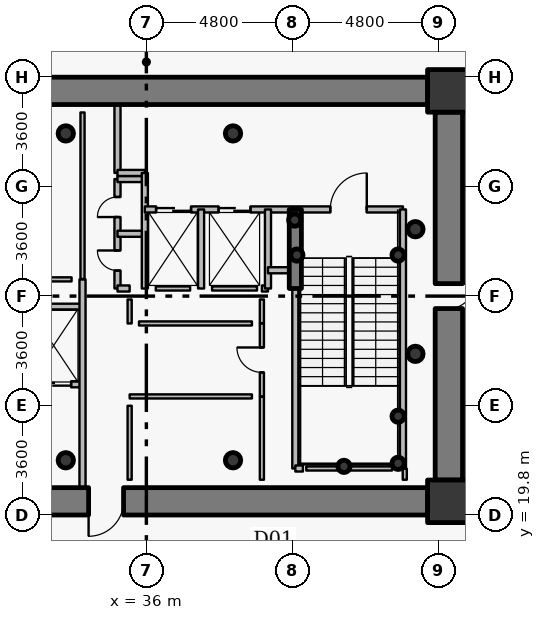
"""IFC4 building model, lengths in metres.
Left out: names, types, materials, properties, quantities, classifications, styles, units other than length and angle.
Written with IfcOpenShell. Run it as: python <this file> out.ifc"""

import sys

from ifc_helpers import new_model, si_unit, direction, frame, frame_2d, origin, origin_2d, place, context, subcontext, project, spatial, rectangle, hollow_circle, extrude, source, transform, mapped, element, fill, save


model = new_model("IFC4")
c1 = context("Model", 3, precision=1e-05, world=origin(), true_north=direction((0.0, 1.0)))
c2 = subcontext(c1, "Body", "Model", "MODEL_VIEW")
j1 = project(units=[si_unit("LENGTHUNIT", "METRE"), si_unit("PLANEANGLEUNIT", "RADIAN")], contexts=[c1])
p1 = place(None, origin())
s1 = spatial("IfcSite", under=j1, at=p1, CompositionType="ELEMENT")
p2 = place(p1, origin())
s2 = spatial("IfcBuilding", under=s1, at=p2, CompositionType="ELEMENT")
p3 = place(p2, frame((0.0, 0.0, -9.0)))
s3 = spatial("IfcBuildingStorey", under=s2, at=p3, CompositionType="ELEMENT", Elevation=-9.0)
for number, where, z_axis, x_axis in (
    (1, (45.95, 20.25, 0.0), (0.0, 0.0, 1.0), (1.0, 0.0, 0.0)),
    (2, (45.95, 33.75, 0.0), (0.0, 0.0, 1.0), (1.0, 0.0, 0.0)),
):
    element("IfcColumn", number, at=place(p3, frame(where, z_axis=z_axis, x_axis=x_axis)), inside=s3, PredefinedType="COLUMN", context=c2, shape_type="SweptSolid", body=[
        extrude(rectangle(XDim=1.4, YDim=1.4, at=origin_2d()), origin(), (0.0, 0.0, 1.0), 4.5),
    ])
for number, where, z_axis, x_axis in (
    (3, (33.35, 21.6, 0.0), (0.0, 0.0, 1.0), (1.0, 0.0, 0.0)),
    (4, (38.85, 21.6, 0.0), (0.0, 0.0, 1.0), (1.0, 0.0, 0.0)),
    (5, (38.85, 32.35, 0.0), (0.0, 0.0, 1.0), (1.0, 0.0, 0.0)),
    (6, (33.35, 32.35, 0.0), (0.0, 0.0, 1.0), (1.0, 0.0, 0.0)),
):
    element("IfcColumn", number, at=place(p3, frame(where, z_axis=z_axis, x_axis=x_axis)), inside=s3, PredefinedType="COLUMN", context=c2, shape_type="SweptSolid", body=[
        extrude(hollow_circle(Radius=0.254, WallThickness=0.02, at=origin_2d()), origin(), (0.0, 0.0, 1.0), 4.5),
    ])
for number, where, z_axis, x_axis in (
    (7, (44.28, 21.5, 0.0), (0.0, 0.0, 1.0), (1.0, 0.0, 0.0)),
    (8, (44.28, 23.05, 0.0), (0.0, 0.0, 1.0), (1.0, 0.0, 0.0)),
    (9, (42.5, 21.4, 0.0), (0.0, 0.0, 1.0), (1.0, 0.0, 0.0)),
    (10, (40.95, 28.35, 0.0), (0.0, 0.0, 1.0), (1.0, 0.0, 0.0)),
    (11, (44.28, 28.35, 0.0), (0.0, 0.0, 1.0), (1.0, 0.0, 0.0)),
    (12, (40.88, 29.5, 0.0), (0.0, 0.0, 1.0), (1.0, 0.0, 0.0)),
):
    element("IfcColumn", number, at=place(p3, frame(where, z_axis=z_axis, x_axis=x_axis)), inside=s3, PredefinedType="COLUMN", context=c2, shape_type="SweptSolid", body=[
        extrude(hollow_circle(Radius=0.203, WallThickness=0.016, at=origin_2d()), origin(), (0.0, 0.0, 1.0), 4.5),
    ])
p4 = place(p3, frame((26.75, 33.75, 0.0), z_axis=(0.0, 0.0, 1.0), x_axis=(1.0, 0.0, 0.0)))
e13 = element("IfcWall", 13, at=p4, inside=s3, PredefinedType="SHEAR", context=c2, shape_type="SweptSolid", body=[
    extrude(rectangle(XDim=18.5, YDim=0.9, at=frame_2d((9.25, 0.0))), origin(), (0.0, 0.0, 1.0), 3.65),
])
p5 = place(p3, frame((45.95, 33.05, 0.0), z_axis=(0.0, 0.0, 1.0), x_axis=(0.0, -1.0, 0.0)))
e14 = element("IfcWall", 14, at=p5, inside=s3, PredefinedType="SHEAR", context=c2, shape_type="SweptSolid", body=[
    extrude(rectangle(XDim=12.1, YDim=0.9, at=frame_2d((6.05, 0.0))), origin(), (0.0, 0.0, 1.0), 3.65),
])
p6 = place(p5, frame((5.64, 0.0, 0.0)))
e15 = element("IfcOpeningElement", 15, at=p6, cuts=e14, PredefinedType="OPENING", context=c2, shape_type="SweptSolid", body=[
    extrude(rectangle(XDim=0.82, YDim=2.1, at=origin_2d()), frame((0.41, 0.46, 1.05), z_axis=(0.0, -1.0, 0.0), x_axis=(1.0, 0.0, 0.0)), (0.0, 0.0, 1.0), 0.92),
])
p7 = place(p3, frame((45.25, 20.25, 0.0), z_axis=(0.0, 0.0, 1.0), x_axis=(-1.0, 0.0, 0.0)))
e16 = element("IfcWall", 16, at=p7, inside=s3, PredefinedType="SHEAR", context=c2, shape_type="SweptSolid", body=[
    extrude(rectangle(XDim=18.5, YDim=0.9, at=frame_2d((9.25, 0.0))), origin(), (0.0, 0.0, 1.0), 3.65),
])
p8 = place(p7, frame((10.0, 0.0, 0.0)))
e17 = element("IfcOpeningElement", 17, at=p8, cuts=e16, PredefinedType="OPENING", context=c2, shape_type="SweptSolid", body=[
    extrude(rectangle(XDim=1.15, YDim=2.15, at=origin_2d()), frame((0.575, 0.46, 1.075), z_axis=(0.0, -1.0, 0.0), x_axis=(1.0, 0.0, 0.0)), (0.0, 0.0, 1.0), 0.92),
])
p9 = place(p3, frame((40.9, 27.25, 0.0), z_axis=(0.0, 0.0, 1.0), x_axis=(0.0, 1.0, 0.0)))
e18 = element("IfcWall", 18, at=p9, inside=s3, PredefinedType="SHEAR", context=c2, shape_type="SweptSolid", body=[
    extrude(rectangle(XDim=2.6, YDim=0.4, at=frame_2d((1.3, 0.0))), origin(), (0.0, 0.0, 1.0), 3.8),
])
for number, where, z_axis, x_axis in (
    (19, (44.85, 25.1, 0.0), (0.0, 0.0, 1.0), (1.0, 0.0, 0.0)),
    (20, (44.85, 29.2, 0.0), (0.0, 0.0, 1.0), (1.0, 0.0, 0.0)),
):
    element("IfcColumn", number, at=place(p3, frame(where, z_axis=z_axis, x_axis=x_axis)), inside=s3, PredefinedType="COLUMN", context=c2, shape_type="SweptSolid", body=[
        extrude(hollow_circle(Radius=0.254, WallThickness=0.02, at=origin_2d()), origin(), (0.0, 0.0, 1.0), 4.5),
    ])
p10 = place(p3, frame((32.0, 24.1, 0.0), z_axis=(0.0, 0.0, 1.0), x_axis=(1.0, 0.0, 0.0)))
e21 = element("IfcWall", 21, at=p10, inside=s3, PredefinedType="PARTITIONING", context=c2, shape_type="SweptSolid", body=[
    extrude(rectangle(XDim=1.9, YDim=0.2, at=frame_2d((0.95, 0.0))), origin(), (0.0, 0.0, 1.0), 3.785),
])
p11 = place(p10, frame((0.375, 0.0, 0.0)))
e22 = element("IfcOpeningElement", 22, at=p11, cuts=e21, PredefinedType="OPENING", context=c2, shape_type="SweptSolid", body=[
    extrude(rectangle(XDim=1.15, YDim=2.15, at=origin_2d()), frame((0.575, 0.11, 1.075), z_axis=(0.0, -1.0, 0.0), x_axis=(1.0, 0.0, 0.0)), (0.0, 0.0, 1.0), 0.22),
])
p12 = place(p3, frame((32.0, 26.65, 0.0), z_axis=(0.0, 0.0, 1.0), x_axis=(1.0, 0.0, 0.0)))
e23 = element("IfcWall", 23, at=p12, inside=s3, PredefinedType="PARTITIONING", context=c2, shape_type="SweptSolid", body=[
    extrude(rectangle(XDim=1.9, YDim=0.2, at=frame_2d((0.95, 0.0))), origin(), (0.0, 0.0, 1.0), 3.785),
])
p13 = place(p3, frame((33.9, 20.7, 0.0), z_axis=(0.0, 0.0, 1.0), x_axis=(0.0, 1.0, 0.0)))
e24 = element("IfcWall", 24, at=p13, inside=s3, PredefinedType="PARTITIONING", context=c2, shape_type="SweptSolid", body=[
    extrude(rectangle(XDim=6.85, YDim=0.2, at=frame_2d((3.425, 0.0))), origin(), (0.0, 0.0, 1.0), 3.785),
])
p14 = place(p3, frame((35.05, 27.25, 0.0), z_axis=(0.0, 0.0, 1.0), x_axis=(0.0, 1.0, 0.0)))
e25 = element("IfcWall", 25, at=p14, inside=s3, PredefinedType="PARTITIONING", context=c2, shape_type="SweptSolid", body=[
    extrude(rectangle(XDim=3.6, YDim=0.2, at=frame_2d((1.8, 0.0))), origin(), (0.0, 0.0, 1.0), 4.2),
])
p15 = place(p14, frame((0.59, 0.0, 0.0)))
e26 = element("IfcOpeningElement", 26, at=p15, cuts=e25, PredefinedType="OPENING", context=c2, shape_type="SweptSolid", body=[
    extrude(rectangle(XDim=0.66, YDim=2.05, at=origin_2d()), frame((0.33, 0.11, 1.025), z_axis=(0.0, -1.0, 0.0), x_axis=(1.0, 0.0, 0.0)), (0.0, 0.0, 1.0), 0.22),
])
p16 = place(p14, frame((2.35, 0.0, 0.0)))
e27 = element("IfcOpeningElement", 27, at=p16, cuts=e25, PredefinedType="OPENING", context=c2, shape_type="SweptSolid", body=[
    extrude(rectangle(XDim=0.66, YDim=2.05, at=origin_2d()), frame((0.33, 0.11, 1.025), z_axis=(0.0, -1.0, 0.0), x_axis=(1.0, 0.0, 0.0)), (0.0, 0.0, 1.0), 0.22),
])
p17 = place(p3, frame((35.05, 27.25, 0.0), z_axis=(0.0, 0.0, 1.0), x_axis=(1.0, 0.0, 0.0)))
e28 = element("IfcWall", 28, at=p17, inside=s3, PredefinedType="PARTITIONING", context=c2, shape_type="SweptSolid", body=[
    extrude(rectangle(XDim=0.4, YDim=0.2, at=frame_2d((0.2, 0.0))), origin(), (0.0, 0.0, 1.0), 4.2),
])
for number, where, z_axis, x_axis in (
    (29, (35.05, 29.05, 0.0), (0.0, 0.0, 1.0), (1.0, 0.0, 0.0)),
    (30, (35.05, 30.85, 0.0), (0.0, 0.0, 1.0), (1.0, 0.0, 0.0)),
):
    element("IfcWall", number, at=place(p3, frame(where, z_axis=z_axis, x_axis=x_axis)), inside=s3, PredefinedType="PARTITIONING", context=c2, shape_type="SweptSolid", body=[
        extrude(rectangle(XDim=0.9, YDim=0.2, at=frame_2d((0.45, 0.0))), origin(), (0.0, 0.0, 1.0), 4.2),
    ])
p18 = place(p3, frame((35.05, 31.05, 0.0), z_axis=(0.0, 0.0, 1.0), x_axis=(0.0, 1.0, 0.0)))
e31 = element("IfcWall", 31, at=p18, inside=s3, PredefinedType="PARTITIONING", context=c2, shape_type="SweptSolid", body=[
    extrude(rectangle(XDim=2.25, YDim=0.2, at=frame_2d((1.125, 0.0))), origin(), (0.0, 0.0, 1.0), 3.785),
])
p19 = place(p3, frame((35.05, 31.05, 0.0), z_axis=(0.0, 0.0, 1.0), x_axis=(1.0, 0.0, 0.0)))
e32 = element("IfcWall", 32, at=p19, inside=s3, PredefinedType="PARTITIONING", context=c2, shape_type="SweptSolid", body=[
    extrude(rectangle(XDim=0.9, YDim=0.2, at=frame_2d((0.45, 0.0))), origin(), (0.0, 0.0, 1.0), 4.2),
])
p20 = place(p3, frame((35.95, 27.25, 0.0), z_axis=(0.0, 0.0, 1.0), x_axis=(0.0, 1.0, 0.0)))
e33 = element("IfcWall", 33, at=p20, inside=s3, PredefinedType="PARTITIONING", context=c2, shape_type="SweptSolid", body=[
    extrude(rectangle(XDim=3.8, YDim=0.2, at=frame_2d((1.9, 0.0))), origin(), (0.0, 0.0, 1.0), 4.2),
])
p21 = place(p3, frame((35.95, 29.85, 0.0), z_axis=(0.0, 0.0, 1.0), x_axis=(1.0, 0.0, 0.0)))
e34 = element("IfcWall", 34, at=p21, inside=s3, PredefinedType="PARTITIONING", context=c2, shape_type="SweptSolid", body=[
    extrude(rectangle(XDim=8.49, YDim=0.2, at=frame_2d((4.245, 0.0))), origin(), (0.0, 0.0, 1.0), 3.785),
])
p22 = place(p21, frame((6.1, 0.0, 0.0)))
e35 = element("IfcOpeningElement", 35, at=p22, cuts=e34, PredefinedType="OPENING", context=c2, shape_type="SweptSolid", body=[
    extrude(rectangle(XDim=1.2, YDim=2.15, at=origin_2d()), frame((0.6, 0.11, 1.075), z_axis=(0.0, -1.0, 0.0), x_axis=(1.0, 0.0, 0.0)), (0.0, 0.0, 1.0), 0.22),
])
p23 = place(p21, frame((0.37, 0.0, 0.0)))
e36 = element("IfcOpeningElement", 36, at=p23, cuts=e34, PredefinedType="OPENING", context=c2, shape_type="SweptSolid", body=[
    extrude(rectangle(XDim=1.15, YDim=2.15, at=origin_2d()), frame((0.575, 0.11, 1.075), z_axis=(0.0, -1.0, 0.0), x_axis=(1.0, 0.0, 0.0)), (0.0, 0.0, 1.0), 0.22),
])
p24 = place(p21, frame((2.425, 0.0, 0.0)))
e37 = element("IfcOpeningElement", 37, at=p24, cuts=e34, PredefinedType="OPENING", context=c2, shape_type="SweptSolid", body=[
    extrude(rectangle(XDim=1.05, YDim=2.15, at=origin_2d()), frame((0.525, 0.11, 1.075), z_axis=(0.0, -1.0, 0.0), x_axis=(1.0, 0.0, 0.0)), (0.0, 0.0, 1.0), 0.22),
])
p25 = place(p3, frame((37.8, 27.25, 0.0), z_axis=(0.0, 0.0, 1.0), x_axis=(0.0, 1.0, 0.0)))
e38 = element("IfcWall", 38, at=p25, inside=s3, PredefinedType="PARTITIONING", context=c2, shape_type="SweptSolid", body=[
    extrude(rectangle(XDim=2.6, YDim=0.2, at=frame_2d((1.3, 0.0))), origin(), (0.0, 0.0, 1.0), 4.2),
])
p26 = place(p3, frame((39.8, 23.7, 0.0), z_axis=(0.0, 0.0, 1.0), x_axis=(0.0, 1.0, 0.0)))
e39 = element("IfcWall", 39, at=p26, inside=s3, PredefinedType="PARTITIONING", context=c2, shape_type="SweptSolid", body=[
    extrude(rectangle(XDim=2.4, YDim=0.135, at=frame_2d((1.2, 0.0))), origin(), (0.0, 0.0, 1.0), 4.2),
])
p27 = place(p26, frame((0.79, 0.0, 0.0)))
e40 = element("IfcOpeningElement", 40, at=p27, cuts=e39, PredefinedType="OPENING", context=c2, shape_type="SweptSolid", body=[
    extrude(rectangle(XDim=0.82, YDim=2.1, at=origin_2d()), frame((0.41, 0.078, 1.05), z_axis=(0.0, -1.0, 0.0), x_axis=(1.0, 0.0, 0.0)), (0.0, 0.0, 1.0), 0.155),
])
p28 = place(p3, frame((39.8, 27.25, 0.0), z_axis=(0.0, 0.0, 1.0), x_axis=(1.0, 0.0, 0.0)))
e41 = element("IfcWall", 41, at=p28, inside=s3, PredefinedType="PARTITIONING", context=c2, shape_type="SweptSolid", body=[
    extrude(rectangle(XDim=0.2, YDim=0.2, at=frame_2d((0.1, 0.0))), origin(), (0.0, 0.0, 1.0), 4.2),
])
p29 = place(p3, frame((40.0, 27.25, 0.0), z_axis=(0.0, 0.0, 1.0), x_axis=(0.0, 1.0, 0.0)))
e42 = element("IfcWall", 42, at=p29, inside=s3, PredefinedType="PARTITIONING", context=c2, shape_type="SweptSolid", body=[
    extrude(rectangle(XDim=2.6, YDim=0.2, at=frame_2d((1.3, 0.0))), origin(), (0.0, 0.0, 1.0), 4.2),
])
p30 = place(p3, frame((40.0, 27.85, 0.0), z_axis=(0.0, 0.0, 1.0), x_axis=(1.0, 0.0, 0.0)))
e43 = element("IfcWall", 43, at=p30, inside=s3, PredefinedType="PARTITIONING", context=c2, shape_type="SweptSolid", body=[
    extrude(rectangle(XDim=0.9, YDim=0.2, at=frame_2d((0.45, 0.0))), origin(), (0.0, 0.0, 1.0), 4.2),
])
p31 = place(p3, frame((40.9, 21.33, 0.0), z_axis=(0.0, 0.0, 1.0), x_axis=(0.0, 1.0, 0.0)))
e44 = element("IfcWall", 44, at=p31, inside=s3, PredefinedType="PARTITIONING", context=c2, shape_type="SweptSolid", body=[
    extrude(rectangle(XDim=5.91, YDim=0.2, at=frame_2d((2.955, 0.0))), origin(), (0.0, 0.0, 1.0), 3.735),
])
p32 = place(p3, frame((40.9, 21.33, 0.0), z_axis=(0.0, 0.0, 1.0), x_axis=(1.0, 0.0, 0.0)))
e45 = element("IfcWall", 45, at=p32, inside=s3, PredefinedType="PARTITIONING", context=c2, shape_type="SweptSolid", body=[
    extrude(rectangle(XDim=0.25, YDim=0.2, at=frame_2d((0.125, 0.0))), origin(), (0.0, 0.0, 1.0), 3.735),
])
p33 = place(p3, frame((44.44, 21.33, 0.0), z_axis=(0.0, 0.0, 1.0), x_axis=(0.0, 1.0, 0.0)))
e46 = element("IfcWall", 46, at=p33, inside=s3, PredefinedType="PARTITIONING", context=c2, shape_type="SweptSolid", body=[
    extrude(rectangle(XDim=8.52, YDim=0.2, at=frame_2d((4.26, 0.0))), origin(), (0.0, 0.0, 1.0), 4.2),
])
p34 = place(p3, frame((44.08, 21.33, 0.0), z_axis=(0.0, 0.0, 1.0), x_axis=(-1.0, 0.0, 0.0)))
e47 = element("IfcWall", 47, at=p34, inside=s3, PredefinedType="PARTITIONING", context=c2, shape_type="SweptSolid", body=[
    extrude(rectangle(XDim=2.82, YDim=0.135, at=frame_2d((1.41, 0.0))), origin(), (0.0, 0.0, 1.0), 3.735),
])
p35 = place(p3, frame((37.44, 27.25, 0.0), z_axis=(0.0, 0.0, 1.0), x_axis=(-1.0, 0.0, 0.0)))
e48 = element("IfcWall", 48, at=p35, inside=s3, PredefinedType="PARTITIONING", context=c2, shape_type="SweptSolid", body=[
    extrude(rectangle(XDim=1.13, YDim=0.135, at=frame_2d((0.565, 0.0))), origin(), (0.0, 0.0, 1.0), 4.2),
])
p36 = place(p3, frame((39.64, 27.25, 0.0), z_axis=(0.0, 0.0, 1.0), x_axis=(-1.0, 0.0, 0.0)))
e49 = element("IfcWall", 49, at=p36, inside=s3, PredefinedType="PARTITIONING", context=c2, shape_type="SweptSolid", body=[
    extrude(rectangle(XDim=1.48, YDim=0.135, at=frame_2d((0.74, 0.0))), origin(), (0.0, 0.0, 1.0), 3.785),
])
p37 = place(p3, frame((32.36, 27.55, 0.0), z_axis=(0.0, 0.0, 1.0), x_axis=(1.0, 0.0, 0.0)))
e50 = element("IfcWall", 50, at=p37, inside=s3, PredefinedType="PARTITIONING", context=c2, shape_type="SweptSolid", body=[
    extrude(rectangle(XDim=1.18, YDim=0.135, at=frame_2d((0.59, 0.0))), origin(), (0.0, 0.0, 1.0), 3.785),
])
p38 = place(p3, frame((39.8, 20.96, 0.0), z_axis=(0.0, 0.0, 1.0), x_axis=(0.0, 1.0, 0.0)))
e51 = element("IfcWall", 51, at=p38, inside=s3, PredefinedType="PARTITIONING", context=c2, shape_type="SweptSolid", body=[
    extrude(rectangle(XDim=2.73, YDim=0.135, at=frame_2d((1.365, 0.0))), origin(), (0.0, 0.0, 1.0), 3.735),
])
p39 = place(p3, frame((39.8, 26.11, 0.0), z_axis=(0.0, 0.0, 1.0), x_axis=(0.0, 1.0, 0.0)))
e52 = element("IfcWall", 52, at=p39, inside=s3, PredefinedType="PARTITIONING", context=c2, shape_type="SweptSolid", body=[
    extrude(rectangle(XDim=0.78, YDim=0.135, at=frame_2d((0.39, 0.0))), origin(), (0.0, 0.0, 1.0), 4.2),
])
p40 = place(p3, frame((44.5, 20.96, 0.0), z_axis=(0.0, 0.0, 1.0), x_axis=(0.0, 1.0, 0.0)))
e53 = element("IfcWall", 53, at=p40, inside=s3, PredefinedType="PARTITIONING", context=c2, shape_type="SweptSolid", body=[
    extrude(rectangle(XDim=0.36, YDim=0.135, at=frame_2d((0.18, 0.0))), origin(), (0.0, 0.0, 1.0), 4.2),
])
p41 = place(p3, frame((35.45, 26.89, 0.0), z_axis=(0.0, 0.0, 1.0), x_axis=(0.0, -1.0, 0.0)))
e54 = element("IfcWall", 54, at=p41, inside=s3, PredefinedType="PARTITIONING", context=c2, shape_type="SweptSolid", body=[
    extrude(rectangle(XDim=0.79, YDim=0.135, at=frame_2d((0.395, 0.0))), origin(), (0.0, 0.0, 1.0), 4.2),
])
p42 = place(p3, frame((35.758, 26.1, 0.0), z_axis=(0.0, 0.0, 1.0), x_axis=(1.0, 0.0, 0.0)))
e55 = element("IfcWall", 55, at=p42, inside=s3, PredefinedType="PARTITIONING", context=c2, shape_type="SweptSolid", body=[
    extrude(rectangle(XDim=3.715, YDim=0.135, at=frame_2d((1.857, 0.0))), origin(), (0.0, 0.0, 1.0), 3.785),
])
p43 = place(p3, frame((39.472, 23.7, 0.0), z_axis=(0.0, 0.0, 1.0), x_axis=(-1.0, 0.0, 0.0)))
e56 = element("IfcWall", 56, at=p43, inside=s3, PredefinedType="PARTITIONING", context=c2, shape_type="SweptSolid", body=[
    extrude(rectangle(XDim=4.022, YDim=0.135, at=frame_2d((2.011, 0.0))), origin(), (0.0, 0.0, 1.0), 3.785),
])
p44 = place(p3, frame((35.45, 23.393, 0.0), z_axis=(0.0, 0.0, 1.0), x_axis=(0.0, -1.0, 0.0)))
e57 = element("IfcWall", 57, at=p44, inside=s3, PredefinedType="PARTITIONING", context=c2, shape_type="SweptSolid", body=[
    extrude(rectangle(XDim=2.433, YDim=0.135, at=frame_2d((1.216, 0.0))), origin(), (0.0, 0.0, 1.0), 3.785),
])
p45 = place(p3, frame((33.9, 27.56, 0.0), z_axis=(0.0, 0.0, 1.0), x_axis=(0.0, 1.0, 0.0)))
e58 = element("IfcWall", 58, at=p45, inside=s3, PredefinedType="PARTITIONING", context=c2, shape_type="SweptSolid", body=[
    extrude(rectangle(XDim=5.48, YDim=0.135, at=frame_2d((2.74, 0.0))), origin(), (0.0, 0.0, 1.0), 3.785),
])
m1 = source(origin(), c2, "Body", "SweptSolid", [
    extrude(rectangle(XDim=0.82, YDim=2.1, at=origin_2d()), frame((0.41, 0.025, 1.05), z_axis=(0.0, -1.0, 0.0), x_axis=(1.0, 0.0, 0.0)), (0.0, 0.0, 1.0), 0.05),
])
p46 = place(p6, origin())
e59 = element("IfcDoor", 59, at=p46, inside=s3, OperationType="SINGLE_SWING_LEFT", PredefinedType="DOOR", context=c2, shape_type="MappedRepresentation", body=[
    mapped(m1, transform((0.0, 0.0, 0.0), x_axis=(1.0, 0.0, 0.0), y_axis=(0.0, 1.0, 0.0), z_axis=(0.0, 0.0, 1.0), scale=1.0)),
])
fill(e15, e59)
m2 = source(origin(), c2, "Body", "SweptSolid", [
    extrude(rectangle(XDim=1.15, YDim=2.15, at=origin_2d()), frame((0.575, 0.025, 1.075), z_axis=(0.0, -1.0, 0.0), x_axis=(1.0, 0.0, 0.0)), (0.0, 0.0, 1.0), 0.05),
])
p47 = place(p8, origin())
e60 = element("IfcDoor", 60, at=p47, inside=s3, OperationType="SINGLE_SWING_RIGHT", PredefinedType="DOOR", context=c2, shape_type="MappedRepresentation", body=[
    mapped(m2, transform((0.0, 0.0, 0.0), x_axis=(1.0, 0.0, 0.0), y_axis=(0.0, 1.0, 0.0), z_axis=(0.0, 0.0, 1.0), scale=1.0)),
])
fill(e17, e60)
m3 = source(origin(), c2, "Body", "SweptSolid", [
    extrude(rectangle(XDim=1.2, YDim=2.15, at=origin_2d()), frame((0.6, 0.025, 1.075), z_axis=(0.0, -1.0, 0.0), x_axis=(1.0, 0.0, 0.0)), (0.0, 0.0, 1.0), 0.05),
])
p48 = place(p22, origin())
e61 = element("IfcDoor", 61, at=p48, inside=s3, OperationType="SINGLE_SWING_RIGHT", PredefinedType="DOOR", context=c2, shape_type="MappedRepresentation", body=[
    mapped(m3, transform((0.0, 0.0, 0.0), x_axis=(1.0, 0.0, 0.0), y_axis=(0.0, 1.0, 0.0), z_axis=(0.0, 0.0, 1.0), scale=1.0)),
])
fill(e35, e61)
m4 = source(origin(), c2, "Body", "SweptSolid", [
    extrude(rectangle(XDim=1.15, YDim=2.15, at=origin_2d()), frame((0.575, 0.025, 1.075), z_axis=(0.0, -1.0, 0.0), x_axis=(1.0, 0.0, 0.0)), (0.0, 0.0, 1.0), 0.05),
])
p49 = place(p23, origin())
e62 = element("IfcDoor", 62, at=p49, inside=s3, OperationType="DOUBLE_DOOR_SLIDING", PredefinedType="USERDEFINED", context=c2, shape_type="MappedRepresentation", body=[
    mapped(m4, transform((0.0, 0.0, 0.0), x_axis=(1.0, 0.0, 0.0), y_axis=(0.0, 1.0, 0.0), z_axis=(0.0, 0.0, 1.0), scale=1.0)),
])
fill(e36, e62)
p50 = place(p11, origin())
e63 = element("IfcDoor", 63, at=p50, inside=s3, OperationType="DOUBLE_DOOR_SLIDING", PredefinedType="USERDEFINED", context=c2, shape_type="MappedRepresentation", body=[
    mapped(m4, transform((0.0, 0.0, 0.0), x_axis=(1.0, 0.0, 0.0), y_axis=(0.0, 1.0, 0.0), z_axis=(0.0, 0.0, 1.0), scale=1.0)),
])
fill(e22, e63)
m5 = source(origin(), c2, "Body", "SweptSolid", [
    extrude(rectangle(XDim=1.05, YDim=2.15, at=origin_2d()), frame((0.525, 0.025, 1.075), z_axis=(0.0, -1.0, 0.0), x_axis=(1.0, 0.0, 0.0)), (0.0, 0.0, 1.0), 0.05),
])
p51 = place(p24, origin())
e64 = element("IfcDoor", 64, at=p51, inside=s3, OperationType="DOUBLE_DOOR_SLIDING", PredefinedType="USERDEFINED", context=c2, shape_type="MappedRepresentation", body=[
    mapped(m5, transform((0.0, 0.0, 0.0), x_axis=(1.0, 0.0, 0.0), y_axis=(0.0, 1.0, 0.0), z_axis=(0.0, 0.0, 1.0), scale=1.0)),
])
fill(e37, e64)
m6 = source(origin(), c2, "Body", "SweptSolid", [
    extrude(rectangle(XDim=0.66, YDim=2.05, at=origin_2d()), frame((0.33, 0.025, 1.025), z_axis=(0.0, -1.0, 0.0), x_axis=(1.0, 0.0, 0.0)), (0.0, 0.0, 1.0), 0.05),
])
p52 = place(p15, origin())
e65 = element("IfcDoor", 65, at=p52, inside=s3, OperationType="SINGLE_SWING_RIGHT", PredefinedType="USERDEFINED", context=c2, shape_type="MappedRepresentation", body=[
    mapped(m6, transform((0.0, 0.0, 0.0), x_axis=(1.0, 0.0, 0.0), y_axis=(0.0, 1.0, 0.0), z_axis=(0.0, 0.0, 1.0), scale=1.0)),
])
fill(e26, e65)
p53 = place(p16, origin())
e66 = element("IfcDoor", 66, at=p53, inside=s3, OperationType="SINGLE_SWING_LEFT", PredefinedType="USERDEFINED", context=c2, shape_type="MappedRepresentation", body=[
    mapped(m6, transform((0.0, 0.0, 0.0), x_axis=(1.0, 0.0, 0.0), y_axis=(0.0, 1.0, 0.0), z_axis=(0.0, 0.0, 1.0), scale=1.0)),
])
fill(e27, e66)
p54 = place(p27, origin())
e67 = element("IfcDoor", 67, at=p54, inside=s3, OperationType="SINGLE_SWING_RIGHT", PredefinedType="DOOR", context=c2, shape_type="MappedRepresentation", body=[
    mapped(m1, transform((0.0, 0.0, 0.0), x_axis=(1.0, 0.0, 0.0), y_axis=(0.0, 1.0, 0.0), z_axis=(0.0, 0.0, 1.0), scale=1.0)),
])
fill(e40, e67)
save(model, sys.argv[1])
